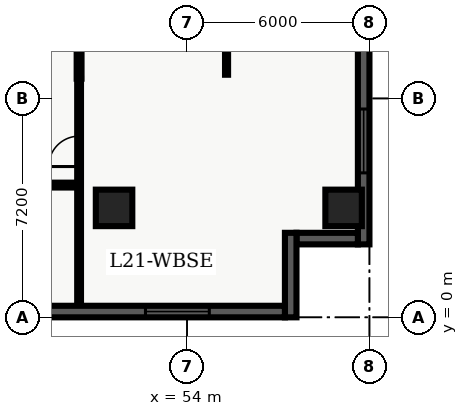
"""IFC4 building model, lengths in metres.
Left out: names, types, materials, properties, quantities, classifications, styles, units other than length and angle.
Written with IfcOpenShell. Run it as: python <this file> out.ifc"""

import sys

from ifc_helpers import new_model, entity, si_unit, converted_unit, direction, frame, origin_with_axes, origin_2d_with_axis, place, context, subcontext, project, spatial, polyline, rectangle, outline, extrude, element, fill, save


model = new_model("IFC4")
c1 = context("Model", 3, precision=1e-05, world=origin_with_axes(), true_north=direction((0.0, 1.0)))
c2 = subcontext(c1, "Body", "Model", "MODEL_VIEW")
j1 = project(units=[si_unit("LENGTHUNIT", "METRE"), converted_unit("PLANEANGLEUNIT", "DEGREE", entity("IfcPlaneAngleMeasure", 0.017), si_unit("PLANEANGLEUNIT", "RADIAN"), dimensions=[0, 0, 0, 0, 0, 0, 0])], contexts=[c1])
p1 = place(None, origin_with_axes())
s1 = spatial("IfcSite", under=j1, at=p1, CompositionType="ELEMENT")
p2 = place(p1, origin_with_axes())
s2 = spatial("IfcBuilding", under=s1, at=p2, CompositionType="ELEMENT")
p3 = place(p2, frame((0.0, 0.0, 89.1), z_axis=(0.0, 0.0, 1.0), x_axis=(1.0, 0.0, 0.0)))
s3 = spatial("IfcBuildingStorey", under=s2, at=p3, CompositionType="ELEMENT", Elevation=89.1)
for number, where, z_axis, x_axis in (
    (1, (51.6, 3.6, 0.0), (0.0, 0.0, 1.0), (1.0, 0.0, 0.0)),
    (2, (59.15, 3.6, 0.0), (0.0, 0.0, 1.0), (1.0, 0.0, 0.0)),
):
    element("IfcColumn", number, at=place(p3, frame(where, z_axis=z_axis, x_axis=x_axis)), inside=s3, PredefinedType="COLUMN", context=c2, shape_type="SweptSolid", body=[
        extrude(rectangle(XDim=1.2, YDim=1.2, at=origin_2d_with_axis()), origin_with_axes(), (0.0, 0.0, 1.0), 3.9),
    ])
p4 = place(p3, frame((50.45, 7.85, 0.0), z_axis=(0.0, 0.0, 1.0), x_axis=(0.0, 1.0, 0.0)))
e3 = element("IfcWall", 3, at=p4, inside=s3, PredefinedType="PARTITIONING", context=c2, shape_type="SweptSolid", body=[
    extrude(outline(polyline([(0.0, -0.08), (18.8, -0.08), (18.8, 0.08), (0.0, 0.08), (0.0, -0.08)])), origin_with_axes(), (0.0, 0.0, 1.0), 2.7),
])
p5 = place(p4, frame((4.29, 0.0, 0.0), z_axis=(0.0, 0.0, 1.0), x_axis=(1.0, 0.0, 0.0)))
e4 = element("IfcOpeningElement", 4, at=p5, cuts=e3, PredefinedType="OPENING", context=c2, shape_type="SweptSolid", body=[
    extrude(rectangle(XDim=1.0, YDim=0.18, at=origin_2d_with_axis()), origin_with_axes(), (0.0, 0.0, 1.0), 2.15),
])
p6 = place(p4, frame((11.57, 0.0, 0.0), z_axis=(0.0, 0.0, 1.0), x_axis=(1.0, 0.0, 0.0)))
e5 = element("IfcOpeningElement", 5, at=p6, cuts=e3, PredefinedType="OPENING", context=c2, shape_type="SweptSolid", body=[
    extrude(rectangle(XDim=1.0, YDim=0.18, at=origin_2d_with_axis()), origin_with_axes(), (0.0, 0.0, 1.0), 2.15),
])
p7 = place(p4, frame((17.93, 0.0, 0.0), z_axis=(0.0, 0.0, 1.0), x_axis=(1.0, 0.0, 0.0)))
e6 = element("IfcOpeningElement", 6, at=p7, cuts=e3, PredefinedType="OPENING", context=c2, shape_type="SweptSolid", body=[
    extrude(rectangle(XDim=1.0, YDim=0.18, at=origin_2d_with_axis()), origin_with_axes(), (0.0, 0.0, 1.0), 2.15),
])
p8 = place(p3, frame((44.55, 4.35, 0.0), z_axis=(0.0, 0.0, 1.0), x_axis=(1.0, 0.0, 0.0)))
e7 = element("IfcWall", 7, at=p8, inside=s3, PredefinedType="PARTITIONING", context=c2, shape_type="SweptSolid", body=[
    extrude(outline(polyline([(0.0, -0.08), (5.9, -0.08), (5.9, 0.08), (0.0, 0.08), (0.0, -0.08)])), origin_with_axes(), (0.0, 0.0, 1.0), 2.7),
])
p9 = place(p8, frame((1.7, 0.0, 0.0), z_axis=(0.0, 0.0, 1.0), x_axis=(1.0, 0.0, 0.0)))
e8 = element("IfcOpeningElement", 8, at=p9, cuts=e7, PredefinedType="OPENING", context=c2, shape_type="SweptSolid", body=[
    extrude(rectangle(XDim=1.0, YDim=0.18, at=origin_2d_with_axis()), origin_with_axes(), (0.0, 0.0, 1.0), 2.15),
])
p10 = place(p3, frame((50.45, 0.36, 0.0), z_axis=(0.0, 0.0, 1.0), x_axis=(0.0, 1.0, 0.0)))
e9 = element("IfcWall", 9, at=p10, inside=s3, PredefinedType="PARTITIONING", context=c2, shape_type="SweptSolid", body=[
    extrude(outline(polyline([(0.0, -0.062), (7.49, -0.062), (7.49, 0.062), (0.0, 0.062), (0.0, -0.062)])), origin_with_axes(), (0.0, 0.0, 1.0), 2.7),
])
p11 = place(p10, frame((5.1, 0.0, 0.0), z_axis=(0.0, 0.0, 1.0), x_axis=(1.0, 0.0, 0.0)))
e10 = element("IfcOpeningElement", 10, at=p11, cuts=e9, PredefinedType="OPENING", context=c2, shape_type="SweptSolid", body=[
    extrude(rectangle(XDim=1.0, YDim=0.145, at=origin_2d_with_axis()), origin_with_axes(), (0.0, 0.0, 1.0), 2.15),
])
p12 = place(p3, frame((55.3, 7.98, 0.0), z_axis=(0.0, 0.0, 1.0), x_axis=(0.0, 1.0, 0.0)))
e11 = element("IfcWall", 11, at=p12, inside=s3, PredefinedType="PARTITIONING", context=c2, shape_type="SweptSolid", body=[
    extrude(outline(polyline([(0.0, -0.05), (18.54, -0.05), (18.54, 0.05), (0.0, 0.05), (0.0, -0.05)])), origin_with_axes(), (0.0, 0.0, 1.0), 2.7),
])
p13 = place(p12, frame((3.28, 0.0, 0.0), z_axis=(0.0, 0.0, 1.0), x_axis=(1.0, 0.0, 0.0)))
e12 = element("IfcOpeningElement", 12, at=p13, cuts=e11, PredefinedType="OPENING", context=c2, shape_type="SweptSolid", body=[
    extrude(rectangle(XDim=0.95, YDim=0.12, at=origin_2d_with_axis()), origin_with_axes(), (0.0, 0.0, 1.0), 2.15),
])
p14 = place(p12, frame((10.559, 0.0, 0.0), z_axis=(0.0, 0.0, 1.0), x_axis=(1.0, 0.0, 0.0)))
e13 = element("IfcOpeningElement", 13, at=p14, cuts=e11, PredefinedType="OPENING", context=c2, shape_type="SweptSolid", body=[
    extrude(rectangle(XDim=0.95, YDim=0.12, at=origin_2d_with_axis()), origin_with_axes(), (0.0, 0.0, 1.0), 2.15),
])
p15 = place(p12, frame((16.549, 0.0, 0.0), z_axis=(0.0, 0.0, 1.0), x_axis=(1.0, 0.0, 0.0)))
e14 = element("IfcOpeningElement", 14, at=p15, cuts=e11, PredefinedType="OPENING", context=c2, shape_type="SweptSolid", body=[
    extrude(rectangle(XDim=0.95, YDim=0.12, at=origin_2d_with_axis()), origin_with_axes(), (0.0, 0.0, 1.0), 2.15),
])
p16 = place(p3, frame((59.81, 26.02, 0.0), z_axis=(0.0, 0.0, 1.0), x_axis=(0.0, -1.0, 0.0)))
e15 = element("IfcWall", 15, at=p16, inside=s3, PredefinedType="SOLIDWALL", context=c2, shape_type="SweptSolid", body=[
    extrude(outline(polyline([(0.0, -0.19), (23.62, -0.19), (23.62, 0.19), (0.0, 0.19), (0.0, -0.19)])), origin_with_axes(), (0.0, 0.0, 1.0), 3.66),
])
p17 = place(p16, frame((20.218, 0.0, 0.45), z_axis=(0.0, 0.0, 1.0), x_axis=(1.0, 0.0, 0.0)))
e16 = element("IfcOpeningElement", 16, at=p17, cuts=e15, PredefinedType="OPENING", context=c2, shape_type="SweptSolid", body=[
    extrude(rectangle(XDim=2.1, YDim=0.4, at=origin_2d_with_axis()), origin_with_axes(), (0.0, 0.0, 1.0), 2.2),
])
p18 = place(p3, frame((59.62, 2.59, 0.0), z_axis=(0.0, 0.0, 1.0), x_axis=(-1.0, 0.0, 0.0)))
e17 = element("IfcWall", 17, at=p18, inside=s3, PredefinedType="SOLIDWALL", context=c2, shape_type="SweptSolid", body=[
    extrude(outline(polyline([(0.0, -0.19), (2.02, -0.19), (2.02, 0.19), (0.0, 0.19), (0.0, -0.19)])), origin_with_axes(), (0.0, 0.0, 1.0), 3.66),
])
p19 = place(p3, frame((57.41, 2.78, 0.0), z_axis=(0.0, 0.0, 1.0), x_axis=(0.0, -1.0, 0.0)))
e18 = element("IfcWall", 18, at=p19, inside=s3, PredefinedType="SOLIDWALL", context=c2, shape_type="SweptSolid", body=[
    extrude(outline(polyline([(0.0, -0.19), (2.78, -0.19), (2.78, 0.19), (0.0, 0.19), (0.0, -0.19)])), origin_with_axes(), (0.0, 0.0, 1.0), 3.66),
])
p20 = place(p3, frame((57.22, 0.19, 0.0), z_axis=(0.0, 0.0, 1.0), x_axis=(-1.0, 0.0, 0.0)))
e19 = element("IfcWall", 19, at=p20, inside=s3, PredefinedType="SOLIDWALL", context=c2, shape_type="SweptSolid", body=[
    extrude(outline(polyline([(0.0, -0.19), (18.82, -0.19), (18.82, 0.19), (0.0, 0.19), (0.0, -0.19)])), origin_with_axes(), (0.0, 0.0, 1.0), 3.66),
])
p21 = place(p20, frame((3.537, 0.0, 0.45), z_axis=(0.0, 0.0, 1.0), x_axis=(1.0, 0.0, 0.0)))
e20 = element("IfcOpeningElement", 20, at=p21, cuts=e19, PredefinedType="OPENING", context=c2, shape_type="SweptSolid", body=[
    extrude(rectangle(XDim=2.1, YDim=0.4, at=origin_2d_with_axis()), origin_with_axes(), (0.0, 0.0, 1.0), 2.2),
])
p22 = place(p20, frame((9.41, 0.0, 0.45), z_axis=(0.0, 0.0, 1.0), x_axis=(1.0, 0.0, 0.0)))
e21 = element("IfcOpeningElement", 21, at=p22, cuts=e19, PredefinedType="OPENING", context=c2, shape_type="SweptSolid", body=[
    extrude(rectangle(XDim=2.1, YDim=0.4, at=origin_2d_with_axis()), origin_with_axes(), (0.0, 0.0, 1.0), 2.2),
])
p23 = place(p20, frame((15.283, 0.0, 0.45), z_axis=(0.0, 0.0, 1.0), x_axis=(1.0, 0.0, 0.0)))
e22 = element("IfcOpeningElement", 22, at=p23, cuts=e19, PredefinedType="OPENING", context=c2, shape_type="SweptSolid", body=[
    extrude(rectangle(XDim=2.1, YDim=0.4, at=origin_2d_with_axis()), origin_with_axes(), (0.0, 0.0, 1.0), 2.2),
])
p24 = place(p10, frame((5.1, 0.0, 0.0), z_axis=(0.0, 0.0, 1.0), x_axis=(1.0, 0.0, 0.0)))
e23 = element("IfcDoor", 23, at=p24, inside=s3, OperationType="SINGLE_SWING_LEFT", PredefinedType="DOOR", context=c2, shape_type="SweptSolid", body=[
    extrude(rectangle(XDim=1.0, YDim=0.075, at=origin_2d_with_axis()), origin_with_axes(), (0.0, 0.0, 1.0), 2.15),
])
fill(e10, e23)
p25 = place(p16, frame((20.218, 0.0, 0.45), z_axis=(0.0, 0.0, 1.0), x_axis=(1.0, 0.0, 0.0)))
e24 = element("IfcWindow", 24, at=p25, inside=s3, PredefinedType="WINDOW", context=c2, shape_type="SweptSolid", body=[
    extrude(rectangle(XDim=2.1, YDim=0.09, at=origin_2d_with_axis()), origin_with_axes(), (0.0, 0.0, 1.0), 2.2),
])
fill(e16, e24)
p26 = place(p20, frame((3.537, 0.0, 0.45), z_axis=(0.0, 0.0, 1.0), x_axis=(1.0, 0.0, 0.0)))
e25 = element("IfcWindow", 25, at=p26, inside=s3, PredefinedType="WINDOW", context=c2, shape_type="SweptSolid", body=[
    extrude(rectangle(XDim=2.1, YDim=0.09, at=origin_2d_with_axis()), origin_with_axes(), (0.0, 0.0, 1.0), 2.2),
])
fill(e20, e25)
save(model, sys.argv[1])
